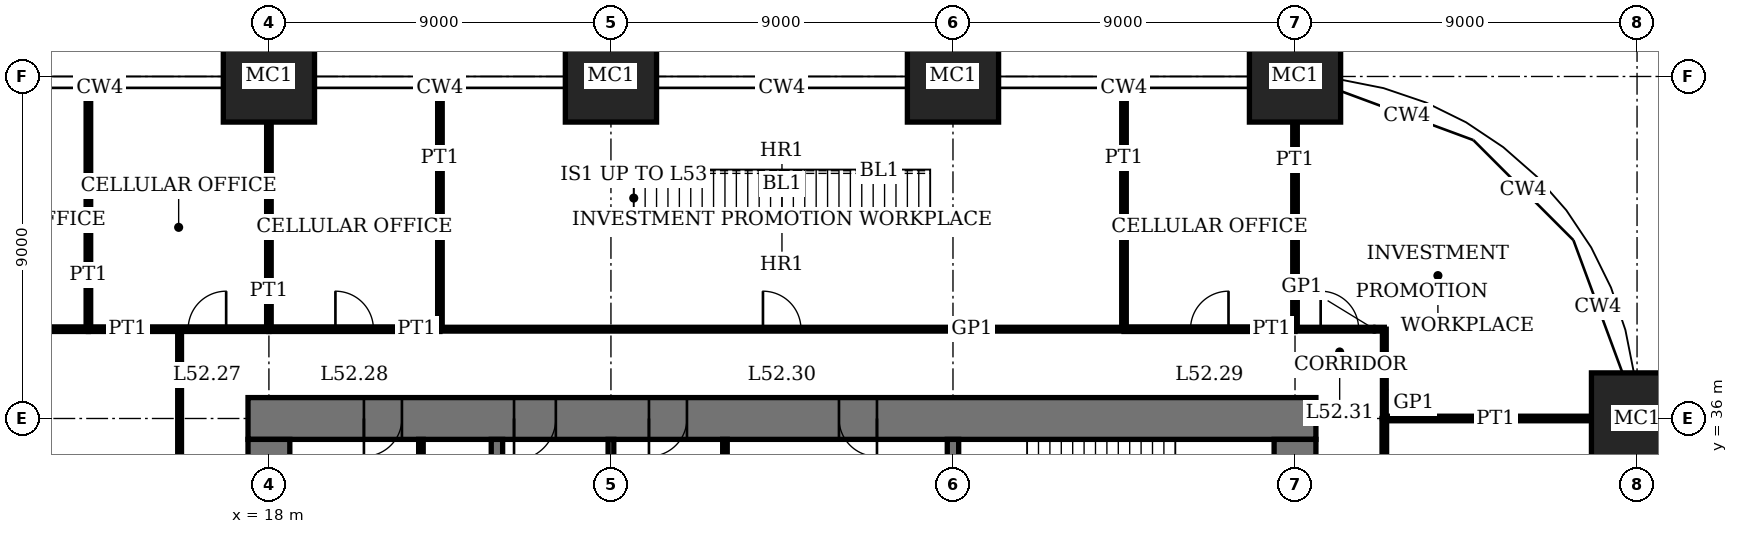
"""IFC4 building model, lengths in metres.
Left out: names, types, materials, properties, quantities, classifications, styles, units other than length and angle.
Written with IfcOpenShell. Run it as: python <this file> out.ifc"""

import sys

from ifc_helpers import new_model, si_unit, direction, frame, frame_2d, origin, origin_2d, place, context, subcontext, project, spatial, rectangle, extrude, element, fill, save


model = new_model("IFC4")
c1 = context("Model", 3, precision=1e-05, world=origin(), true_north=direction((0.0, 1.0)))
c2 = subcontext(c1, "Body", "Model", "MODEL_VIEW")
j1 = project(units=[si_unit("LENGTHUNIT", "METRE"), si_unit("PLANEANGLEUNIT", "RADIAN")], contexts=[c1])
p1 = place(None, origin())
s1 = spatial("IfcSite", under=j1, at=p1, CompositionType="ELEMENT")
p2 = place(p1, origin())
s2 = spatial("IfcBuilding", under=s1, at=p2, CompositionType="ELEMENT")
p3 = place(p2, frame((0.0, 0.0, 214.2)))
s3 = spatial("IfcBuildingStorey", under=s2, at=p3, CompositionType="ELEMENT", Elevation=214.2)
for number, where, z_axis, x_axis in (
    (1, (18.0, 45.0, 0.0), (0.0, 0.0, 1.0), (1.0, 0.0, 0.0)),
    (2, (27.0, 45.0, 0.0), (0.0, 0.0, 1.0), (1.0, 0.0, 0.0)),
    (3, (36.0, 45.0, 0.0), (0.0, 0.0, 1.0), (1.0, 0.0, 0.0)),
    (4, (45.0, 45.0, 0.0), (0.0, 0.0, 1.0), (1.0, 0.0, 0.0)),
    (5, (54.0, 36.0, 0.0), (0.0, 0.0, 1.0), (1.0, 0.0, 0.0)),
):
    element("IfcColumn", number, at=place(p3, frame(where, z_axis=z_axis, x_axis=x_axis)), inside=s3, PredefinedType="COLUMN", context=c2, shape_type="SweptSolid", body=[
        extrude(rectangle(XDim=2.4, YDim=2.4, at=origin_2d()), origin(), (0.0, 0.0, 1.0), 4.0),
    ])
p4 = place(p3, frame((45.55, 36.0, 0.0), z_axis=(0.0, 0.0, 1.0), x_axis=(-1.0, 0.0, 0.0)))
e6 = element("IfcWall", 6, at=p4, inside=s3, PredefinedType="SHEAR", context=c2, shape_type="SweptSolid", body=[
    extrude(rectangle(XDim=28.1, YDim=1.1, at=frame_2d((14.05, 0.0))), origin(), (0.0, 0.0, 1.0), 4.0),
])
p5 = place(p4, frame((11.55, 0.0, 0.0)))
e7 = element("IfcOpeningElement", 7, at=p5, cuts=e6, PredefinedType="OPENING", context=c2, shape_type="SweptSolid", body=[
    extrude(rectangle(XDim=1.0, YDim=2.4, at=frame_2d((0.5, 1.2))), frame((0.0, 0.56, 0.0), z_axis=(0.0, -1.0, 0.0), x_axis=(1.0, 0.0, 0.0)), (0.0, 0.0, 1.0), 1.12),
])
p6 = place(p4, frame((16.55, 0.0, 0.0)))
e8 = element("IfcOpeningElement", 8, at=p6, cuts=e6, PredefinedType="OPENING", context=c2, shape_type="SweptSolid", body=[
    extrude(rectangle(XDim=1.0, YDim=2.4, at=frame_2d((0.5, 1.2))), frame((0.0, 0.56, 0.0), z_axis=(0.0, -1.0, 0.0), x_axis=(1.0, 0.0, 0.0)), (0.0, 0.0, 1.0), 1.12),
])
p7 = place(p4, frame((20.0, 0.0, 0.0)))
e9 = element("IfcOpeningElement", 9, at=p7, cuts=e6, PredefinedType="OPENING", context=c2, shape_type="SweptSolid", body=[
    extrude(rectangle(XDim=1.1, YDim=2.4, at=frame_2d((0.55, 1.2))), frame((0.0, 0.56, 0.0), z_axis=(0.0, -1.0, 0.0), x_axis=(1.0, 0.0, 0.0)), (0.0, 0.0, 1.0), 1.12),
])
p8 = place(p4, frame((24.05, 0.0, 0.0)))
e10 = element("IfcOpeningElement", 10, at=p8, cuts=e6, PredefinedType="OPENING", context=c2, shape_type="SweptSolid", body=[
    extrude(rectangle(XDim=1.0, YDim=2.4, at=frame_2d((0.5, 1.2))), frame((0.0, 0.56, 0.0), z_axis=(0.0, -1.0, 0.0), x_axis=(1.0, 0.0, 0.0)), (0.0, 0.0, 1.0), 1.12),
])
p9 = place(p3, frame((18.0, 35.45, 0.0), z_axis=(0.0, 0.0, 1.0), x_axis=(0.0, -1.0, 0.0)))
e11 = element("IfcWall", 11, at=p9, inside=s3, PredefinedType="SHEAR", context=c2, shape_type="SweptSolid", body=[
    extrude(rectangle(XDim=16.9, YDim=1.1, at=frame_2d((8.45, 0.0))), origin(), (0.0, 0.0, 1.0), 4.0),
])
p10 = place(p9, frame((8.45, 0.0, 0.0)))
e12 = element("IfcOpeningElement", 12, at=p10, cuts=e11, PredefinedType="OPENING", context=c2, shape_type="SweptSolid", body=[
    extrude(rectangle(XDim=1.8, YDim=2.4, at=frame_2d((0.9, 1.2))), frame((0.0, 0.56, 0.0), z_axis=(0.0, -1.0, 0.0), x_axis=(1.0, 0.0, 0.0)), (0.0, 0.0, 1.0), 1.12),
])
p11 = place(p3, frame((45.0, 18.55, 0.0), z_axis=(0.0, 0.0, 1.0), x_axis=(0.0, 1.0, 0.0)))
e13 = element("IfcWall", 13, at=p11, inside=s3, PredefinedType="SHEAR", context=c2, shape_type="SweptSolid", body=[
    extrude(rectangle(XDim=16.9, YDim=1.1, at=frame_2d((8.45, 0.0))), origin(), (0.0, 0.0, 1.0), 4.0),
])
p12 = place(p11, frame((8.45, 0.0, 0.0)))
e14 = element("IfcOpeningElement", 14, at=p12, cuts=e13, PredefinedType="OPENING", context=c2, shape_type="SweptSolid", body=[
    extrude(rectangle(XDim=1.8, YDim=2.4, at=frame_2d((0.9, 1.2))), frame((0.0, 0.56, 0.0), z_axis=(0.0, -1.0, 0.0), x_axis=(1.0, 0.0, 0.0)), (0.0, 0.0, 1.0), 1.12),
])
p13 = place(p3, frame((36.0, 32.4, 0.0), z_axis=(0.0, 0.0, 1.0), x_axis=(0.0, 1.0, 0.0)))
e15 = element("IfcWall", 15, at=p13, inside=s3, PredefinedType="SHEAR", context=c2, shape_type="SweptSolid", body=[
    extrude(rectangle(XDim=3.05, YDim=0.3, at=frame_2d((1.525, 0.0))), origin(), (0.0, 0.0, 1.0), 4.0),
])
p14 = place(p3, frame((24.0, 29.55, 0.0), z_axis=(0.0, 0.0, 1.0), x_axis=(0.0, 1.0, 0.0)))
e16 = element("IfcWall", 16, at=p14, inside=s3, PredefinedType="SHEAR", context=c2, shape_type="SweptSolid", body=[
    extrude(rectangle(XDim=5.9, YDim=0.3, at=frame_2d((2.95, 0.0))), origin(), (0.0, 0.0, 1.0), 4.0),
])
p15 = place(p3, frame((47.35, 36.0, 0.0), z_axis=(0.0, 0.0, 1.0), x_axis=(1.0, 0.0, 0.0)))
e17 = element("IfcWall", 17, at=p15, inside=s3, PredefinedType="PARTITIONING", context=c2, shape_type="SweptSolid", body=[
    extrude(rectangle(XDim=5.45, YDim=0.12, at=frame_2d((2.725, 0.0))), origin(), (0.0, 0.0, 1.0), 3.05),
])
p16 = place(p3, frame((9.0, 38.35, 0.0), z_axis=(0.0, 0.0, 1.0), x_axis=(1.0, 0.0, 0.0)))
e18 = element("IfcWall", 18, at=p16, inside=s3, PredefinedType="PARTITIONING", context=c2, shape_type="SweptSolid", body=[
    extrude(rectangle(XDim=4.25, YDim=0.12, at=frame_2d((2.125, 0.0))), origin(), (0.0, 0.0, 1.0), 3.75),
])
p17 = place(p16, frame((1.625, 0.0, 0.0)))
e19 = element("IfcOpeningElement", 19, at=p17, cuts=e18, PredefinedType="OPENING", context=c2, shape_type="SweptSolid", body=[
    extrude(rectangle(XDim=1.0, YDim=2.4, at=frame_2d((0.5, 1.2))), frame((0.0, 0.07, 0.0), z_axis=(0.0, -1.0, 0.0), x_axis=(1.0, 0.0, 0.0)), (0.0, 0.0, 1.0), 0.14),
])
p18 = place(p3, frame((13.25, 38.35, 0.0), z_axis=(0.0, 0.0, 1.0), x_axis=(1.0, 0.0, 0.0)))
e20 = element("IfcWall", 20, at=p18, inside=s3, PredefinedType="PARTITIONING", context=c2, shape_type="SweptSolid", body=[
    extrude(rectangle(XDim=4.75, YDim=0.12, at=frame_2d((2.375, 0.0))), origin(), (0.0, 0.0, 1.0), 3.75),
])
p19 = place(p18, frame((2.625, 0.0, 0.0)))
e21 = element("IfcOpeningElement", 21, at=p19, cuts=e20, PredefinedType="OPENING", context=c2, shape_type="SweptSolid", body=[
    extrude(rectangle(XDim=1.0, YDim=2.4, at=frame_2d((0.5, 1.2))), frame((0.0, 0.07, 0.0), z_axis=(0.0, -1.0, 0.0), x_axis=(1.0, 0.0, 0.0)), (0.0, 0.0, 1.0), 0.14),
])
p20 = place(p3, frame((18.0, 38.35, 0.0), z_axis=(0.0, 0.0, 1.0), x_axis=(1.0, 0.0, 0.0)))
e22 = element("IfcWall", 22, at=p20, inside=s3, PredefinedType="PARTITIONING", context=c2, shape_type="SweptSolid", body=[
    extrude(rectangle(XDim=4.5, YDim=0.12, at=frame_2d((2.25, 0.0))), origin(), (0.0, 0.0, 1.0), 3.75),
])
p21 = place(p20, frame((1.75, 0.0, 0.0)))
e23 = element("IfcOpeningElement", 23, at=p21, cuts=e22, PredefinedType="OPENING", context=c2, shape_type="SweptSolid", body=[
    extrude(rectangle(XDim=1.0, YDim=2.4, at=frame_2d((0.5, 1.2))), frame((0.0, 0.07, 0.0), z_axis=(0.0, -1.0, 0.0), x_axis=(1.0, 0.0, 0.0)), (0.0, 0.0, 1.0), 0.14),
])
p22 = place(p3, frame((40.5, 38.35, 0.0), z_axis=(0.0, 0.0, 1.0), x_axis=(1.0, 0.0, 0.0)))
e24 = element("IfcWall", 24, at=p22, inside=s3, PredefinedType="PARTITIONING", context=c2, shape_type="SweptSolid", body=[
    extrude(rectangle(XDim=4.5, YDim=0.12, at=frame_2d((2.25, 0.0))), origin(), (0.0, 0.0, 1.0), 3.75),
])
p23 = place(p22, frame((1.75, 0.0, 0.0)))
e25 = element("IfcOpeningElement", 25, at=p23, cuts=e24, PredefinedType="OPENING", context=c2, shape_type="SweptSolid", body=[
    extrude(rectangle(XDim=1.0, YDim=2.4, at=frame_2d((0.5, 1.2))), frame((0.0, 0.07, 0.0), z_axis=(0.0, -1.0, 0.0), x_axis=(1.0, 0.0, 0.0)), (0.0, 0.0, 1.0), 0.14),
])
p24 = place(p3, frame((22.5, 38.35, 0.0), z_axis=(0.0, 0.0, 1.0), x_axis=(1.0, 0.0, 0.0)))
e26 = element("IfcWall", 26, at=p24, inside=s3, PredefinedType="PARTITIONING", context=c2, shape_type="SweptSolid", body=[
    extrude(rectangle(XDim=18.0, YDim=0.1, at=frame_2d((9.0, 0.0))), origin(), (0.0, 0.0, 1.0), 3.75),
])
p25 = place(p24, frame((8.5, 0.0, 0.0)))
e27 = element("IfcOpeningElement", 27, at=p25, cuts=e26, PredefinedType="OPENING", context=c2, shape_type="SweptSolid", body=[
    extrude(rectangle(XDim=1.0, YDim=2.4, at=frame_2d((0.5, 1.2))), frame((0.0, 0.06, 0.0), z_axis=(0.0, -1.0, 0.0), x_axis=(1.0, 0.0, 0.0)), (0.0, 0.0, 1.0), 0.12),
])
p26 = place(p3, frame((45.0, 38.35, 0.0), z_axis=(0.0, 0.0, 1.0), x_axis=(1.0, 0.0, 0.0)))
e28 = element("IfcWall", 28, at=p26, inside=s3, PredefinedType="PARTITIONING", context=c2, shape_type="SweptSolid", body=[
    extrude(rectangle(XDim=2.35, YDim=0.1, at=frame_2d((1.175, 0.0))), origin(), (0.0, 0.0, 1.0), 3.75),
])
p27 = place(p26, frame((0.675, 0.0, 0.0)))
e29 = element("IfcOpeningElement", 29, at=p27, cuts=e28, PredefinedType="OPENING", context=c2, shape_type="SweptSolid", body=[
    extrude(rectangle(XDim=1.0, YDim=2.4, at=frame_2d((0.5, 1.2))), frame((0.0, 0.06, 0.0), z_axis=(0.0, -1.0, 0.0), x_axis=(1.0, 0.0, 0.0)), (0.0, 0.0, 1.0), 0.12),
])
p28 = place(p3, frame((13.25, 38.35, 0.0), z_axis=(0.0, 0.0, 1.0), x_axis=(0.0, 1.0, 0.0)))
e30 = element("IfcWall", 30, at=p28, inside=s3, PredefinedType="PARTITIONING", context=c2, shape_type="SweptSolid", body=[
    extrude(rectangle(XDim=6.34, YDim=0.12, at=frame_2d((3.17, 0.0))), origin(), (0.0, 0.0, 1.0), 3.75),
])
p29 = place(p3, frame((15.65, 27.0, 0.0), z_axis=(0.0, 0.0, 1.0), x_axis=(0.0, 1.0, 0.0)))
e31 = element("IfcWall", 31, at=p29, inside=s3, PredefinedType="PARTITIONING", context=c2, shape_type="SweptSolid", body=[
    extrude(rectangle(XDim=11.35, YDim=0.1, at=frame_2d((5.675, 0.0))), origin(), (0.0, 0.0, 1.0), 3.75),
])
p30 = place(p3, frame((18.0, 38.35, 0.0), z_axis=(0.0, 0.0, 1.0), x_axis=(0.0, 1.0, 0.0)))
e32 = element("IfcWall", 32, at=p30, inside=s3, PredefinedType="PARTITIONING", context=c2, shape_type="SweptSolid", body=[
    extrude(rectangle(XDim=5.45, YDim=0.12, at=frame_2d((2.725, 0.0))), origin(), (0.0, 0.0, 1.0), 3.05),
])
for number, where, z_axis, x_axis in (
    (33, (22.5, 38.35, 0.0), (0.0, 0.0, 1.0), (0.0, 1.0, 0.0)),
    (34, (40.5, 38.35, 0.0), (0.0, 0.0, 1.0), (0.0, 1.0, 0.0)),
):
    element("IfcWall", number, at=place(p3, frame(where, z_axis=z_axis, x_axis=x_axis)), inside=s3, PredefinedType="PARTITIONING", context=c2, shape_type="SweptSolid", body=[
        extrude(rectangle(XDim=6.34, YDim=0.12, at=frame_2d((3.17, 0.0))), origin(), (0.0, 0.0, 1.0), 3.75),
    ])
p31 = place(p3, frame((45.0, 38.35, 0.0), z_axis=(0.0, 0.0, 1.0), x_axis=(0.0, 1.0, 0.0)))
e35 = element("IfcWall", 35, at=p31, inside=s3, PredefinedType="PARTITIONING", context=c2, shape_type="SweptSolid", body=[
    extrude(rectangle(XDim=5.45, YDim=0.12, at=frame_2d((2.725, 0.0))), origin(), (0.0, 0.0, 1.0), 3.05),
])
p32 = place(p3, frame((47.35, 27.0, 0.0), z_axis=(0.0, 0.0, 1.0), x_axis=(0.0, 1.0, 0.0)))
e36 = element("IfcWall", 36, at=p32, inside=s3, PredefinedType="PARTITIONING", context=c2, shape_type="SweptSolid", body=[
    extrude(rectangle(XDim=9.0, YDim=0.12, at=frame_2d((4.5, 0.0))), origin(), (0.0, 0.0, 1.0), 3.75),
])
p33 = place(p32, frame((4.0, 0.0, 0.0)))
e37 = element("IfcOpeningElement", 37, at=p33, cuts=e36, PredefinedType="OPENING", context=c2, shape_type="SweptSolid", body=[
    extrude(rectangle(XDim=1.0, YDim=2.4, at=frame_2d((0.5, 1.2))), frame((0.0, 0.07, 0.0), z_axis=(0.0, -1.0, 0.0), x_axis=(1.0, 0.0, 0.0)), (0.0, 0.0, 1.0), 0.14),
])
p34 = place(p3, frame((47.35, 36.0, 0.0), z_axis=(0.0, 0.0, 1.0), x_axis=(0.0, 1.0, 0.0)))
e38 = element("IfcWall", 38, at=p34, inside=s3, PredefinedType="PARTITIONING", context=c2, shape_type="SweptSolid", body=[
    extrude(rectangle(XDim=2.35, YDim=0.1, at=frame_2d((1.175, 0.0))), origin(), (0.0, 0.0, 1.0), 3.75),
])
p35 = place(p3, frame((30.0, 32.55, 0.0), z_axis=(0.0, 0.0, 1.0), x_axis=(0.0, 1.0, 0.0)))
e39 = element("IfcWall", 39, at=p35, inside=s3, PredefinedType="PARTITIONING", context=c2, shape_type="SweptSolid", body=[
    extrude(rectangle(XDim=2.9, YDim=0.12, at=frame_2d((1.45, 0.0))), origin(), (0.0, 0.0, 1.0), 3.75),
])
p36 = place(p3, frame((27.0, 32.55, 0.0), z_axis=(0.0, 0.0, 1.0), x_axis=(0.0, 1.0, 0.0)))
e40 = element("IfcWall", 40, at=p36, inside=s3, PredefinedType="PARTITIONING", context=c2, shape_type="SweptSolid", body=[
    extrude(rectangle(XDim=2.9, YDim=0.15, at=frame_2d((1.45, 0.0))), origin(), (0.0, 0.0, 1.0), 3.75),
])
p37 = place(p3, frame((22.0, 32.55, 0.0), z_axis=(0.0, 0.0, 1.0), x_axis=(0.0, 1.0, 0.0)))
e41 = element("IfcWall", 41, at=p37, inside=s3, PredefinedType="PARTITIONING", context=c2, shape_type="SweptSolid", body=[
    extrude(rectangle(XDim=2.9, YDim=0.12, at=frame_2d((1.45, 0.0))), origin(), (0.0, 0.0, 1.0), 3.75),
])
p38 = place(p37, frame((0.95, 0.0, 0.0)))
e42 = element("IfcOpeningElement", 42, at=p38, cuts=e41, PredefinedType="OPENING", context=c2, shape_type="SweptSolid", body=[
    extrude(rectangle(XDim=1.0, YDim=2.4, at=frame_2d((0.5, 1.2))), frame((0.0, 0.07, 0.0), z_axis=(0.0, -1.0, 0.0), x_axis=(1.0, 0.0, 0.0)), (0.0, 0.0, 1.0), 0.14),
])
p39 = place(p5, origin())
e43 = element("IfcDoor", 43, at=p39, inside=s3, OperationType="SINGLE_SWING_RIGHT", PredefinedType="DOOR", context=c2, shape_type="SweptSolid", body=[
    extrude(rectangle(XDim=1.0, YDim=2.4, at=frame_2d((0.5, 1.2))), frame((0.0, 0.025, 0.0), z_axis=(0.0, -1.0, 0.0), x_axis=(1.0, 0.0, 0.0)), (0.0, 0.0, 1.0), 0.05),
    extrude(rectangle(XDim=0.04, YDim=2.4, at=frame_2d((0.02, 1.2))), frame((0.0, 0.4, 0.0), z_axis=(0.0, -1.0, 0.0), x_axis=(1.0, 0.0, 0.0)), (0.0, 0.0, 1.0), 0.8),
    extrude(rectangle(XDim=0.04, YDim=2.4, at=frame_2d((0.98, 1.2))), frame((0.0, 0.4, 0.0), z_axis=(0.0, -1.0, 0.0), x_axis=(1.0, 0.0, 0.0)), (0.0, 0.0, 1.0), 0.8),
    extrude(rectangle(XDim=1.0, YDim=0.04, at=frame_2d((0.5, 2.38))), frame((0.0, 0.4, 0.0), z_axis=(0.0, -1.0, 0.0), x_axis=(1.0, 0.0, 0.0)), (0.0, 0.0, 1.0), 0.8),
])
fill(e7, e43)
p40 = place(p6, origin())
e44 = element("IfcDoor", 44, at=p40, inside=s3, OperationType="SINGLE_SWING_LEFT", PredefinedType="DOOR", context=c2, shape_type="SweptSolid", body=[
    extrude(rectangle(XDim=1.0, YDim=2.4, at=frame_2d((0.5, 1.2))), frame((0.0, 0.025, 0.0), z_axis=(0.0, -1.0, 0.0), x_axis=(1.0, 0.0, 0.0)), (0.0, 0.0, 1.0), 0.05),
    extrude(rectangle(XDim=0.04, YDim=2.4, at=frame_2d((0.02, 1.2))), frame((0.0, 0.4, 0.0), z_axis=(0.0, -1.0, 0.0), x_axis=(1.0, 0.0, 0.0)), (0.0, 0.0, 1.0), 0.8),
    extrude(rectangle(XDim=0.04, YDim=2.4, at=frame_2d((0.98, 1.2))), frame((0.0, 0.4, 0.0), z_axis=(0.0, -1.0, 0.0), x_axis=(1.0, 0.0, 0.0)), (0.0, 0.0, 1.0), 0.8),
    extrude(rectangle(XDim=1.0, YDim=0.04, at=frame_2d((0.5, 2.38))), frame((0.0, 0.4, 0.0), z_axis=(0.0, -1.0, 0.0), x_axis=(1.0, 0.0, 0.0)), (0.0, 0.0, 1.0), 0.8),
])
fill(e8, e44)
p41 = place(p7, origin())
e45 = element("IfcDoor", 45, at=p41, inside=s3, OperationType="SINGLE_SWING_LEFT", PredefinedType="DOOR", context=c2, shape_type="SweptSolid", body=[
    extrude(rectangle(XDim=1.1, YDim=2.4, at=frame_2d((0.55, 1.2))), frame((0.0, 0.025, 0.0), z_axis=(0.0, -1.0, 0.0), x_axis=(1.0, 0.0, 0.0)), (0.0, 0.0, 1.0), 0.05),
    extrude(rectangle(XDim=0.04, YDim=2.4, at=frame_2d((0.02, 1.2))), frame((0.0, 0.44, 0.0), z_axis=(0.0, -1.0, 0.0), x_axis=(1.0, 0.0, 0.0)), (0.0, 0.0, 1.0), 0.88),
    extrude(rectangle(XDim=0.04, YDim=2.4, at=frame_2d((1.08, 1.2))), frame((0.0, 0.44, 0.0), z_axis=(0.0, -1.0, 0.0), x_axis=(1.0, 0.0, 0.0)), (0.0, 0.0, 1.0), 0.88),
    extrude(rectangle(XDim=1.1, YDim=0.04, at=frame_2d((0.55, 2.38))), frame((0.0, 0.44, 0.0), z_axis=(0.0, -1.0, 0.0), x_axis=(1.0, 0.0, 0.0)), (0.0, 0.0, 1.0), 0.88),
])
fill(e9, e45)
p42 = place(p8, origin())
e46 = element("IfcDoor", 46, at=p42, inside=s3, OperationType="SINGLE_SWING_LEFT", PredefinedType="DOOR", context=c2, shape_type="SweptSolid", body=[
    extrude(rectangle(XDim=1.0, YDim=2.4, at=frame_2d((0.5, 1.2))), frame((0.0, 0.025, 0.0), z_axis=(0.0, -1.0, 0.0), x_axis=(1.0, 0.0, 0.0)), (0.0, 0.0, 1.0), 0.05),
    extrude(rectangle(XDim=0.04, YDim=2.4, at=frame_2d((0.02, 1.2))), frame((0.0, 0.4, 0.0), z_axis=(0.0, -1.0, 0.0), x_axis=(1.0, 0.0, 0.0)), (0.0, 0.0, 1.0), 0.8),
    extrude(rectangle(XDim=0.04, YDim=2.4, at=frame_2d((0.98, 1.2))), frame((0.0, 0.4, 0.0), z_axis=(0.0, -1.0, 0.0), x_axis=(1.0, 0.0, 0.0)), (0.0, 0.0, 1.0), 0.8),
    extrude(rectangle(XDim=1.0, YDim=0.04, at=frame_2d((0.5, 2.38))), frame((0.0, 0.4, 0.0), z_axis=(0.0, -1.0, 0.0), x_axis=(1.0, 0.0, 0.0)), (0.0, 0.0, 1.0), 0.8),
])
fill(e10, e46)
p43 = place(p19, origin())
e47 = element("IfcDoor", 47, at=p43, inside=s3, OperationType="SINGLE_SWING_LEFT", PredefinedType="DOOR", context=c2, shape_type="SweptSolid", body=[
    extrude(rectangle(XDim=1.0, YDim=2.4, at=frame_2d((0.5, 1.2))), frame((0.0, 0.025, 0.0), z_axis=(0.0, -1.0, 0.0), x_axis=(1.0, 0.0, 0.0)), (0.0, 0.0, 1.0), 0.05),
])
fill(e21, e47)
p44 = place(p21, origin())
e48 = element("IfcDoor", 48, at=p44, inside=s3, OperationType="SINGLE_SWING_RIGHT", PredefinedType="DOOR", context=c2, shape_type="SweptSolid", body=[
    extrude(rectangle(XDim=1.0, YDim=2.4, at=frame_2d((0.5, 1.2))), frame((0.0, 0.025, 0.0), z_axis=(0.0, -1.0, 0.0), x_axis=(1.0, 0.0, 0.0)), (0.0, 0.0, 1.0), 0.05),
])
fill(e23, e48)
p45 = place(p23, origin())
e49 = element("IfcDoor", 49, at=p45, inside=s3, OperationType="SINGLE_SWING_LEFT", PredefinedType="DOOR", context=c2, shape_type="SweptSolid", body=[
    extrude(rectangle(XDim=1.0, YDim=2.4, at=frame_2d((0.5, 1.2))), frame((0.0, 0.025, 0.0), z_axis=(0.0, -1.0, 0.0), x_axis=(1.0, 0.0, 0.0)), (0.0, 0.0, 1.0), 0.05),
])
fill(e25, e49)
p46 = place(p25, origin())
e50 = element("IfcDoor", 50, at=p46, inside=s3, OperationType="SINGLE_SWING_RIGHT", PredefinedType="DOOR", context=c2, shape_type="SweptSolid", body=[
    extrude(rectangle(XDim=1.0, YDim=2.4, at=frame_2d((0.5, 1.2))), frame((0.0, 0.02, 0.0), z_axis=(0.0, -1.0, 0.0), x_axis=(1.0, 0.0, 0.0)), (0.0, 0.0, 1.0), 0.04),
])
fill(e27, e50)
p47 = place(p27, origin())
e51 = element("IfcDoor", 51, at=p47, inside=s3, OperationType="SINGLE_SWING_RIGHT", PredefinedType="DOOR", context=c2, shape_type="SweptSolid", body=[
    extrude(rectangle(XDim=1.0, YDim=2.4, at=frame_2d((0.5, 1.2))), frame((0.0, 0.02, 0.0), z_axis=(0.0, -1.0, 0.0), x_axis=(1.0, 0.0, 0.0)), (0.0, 0.0, 1.0), 0.04),
])
fill(e29, e51)
save(model, sys.argv[1])
